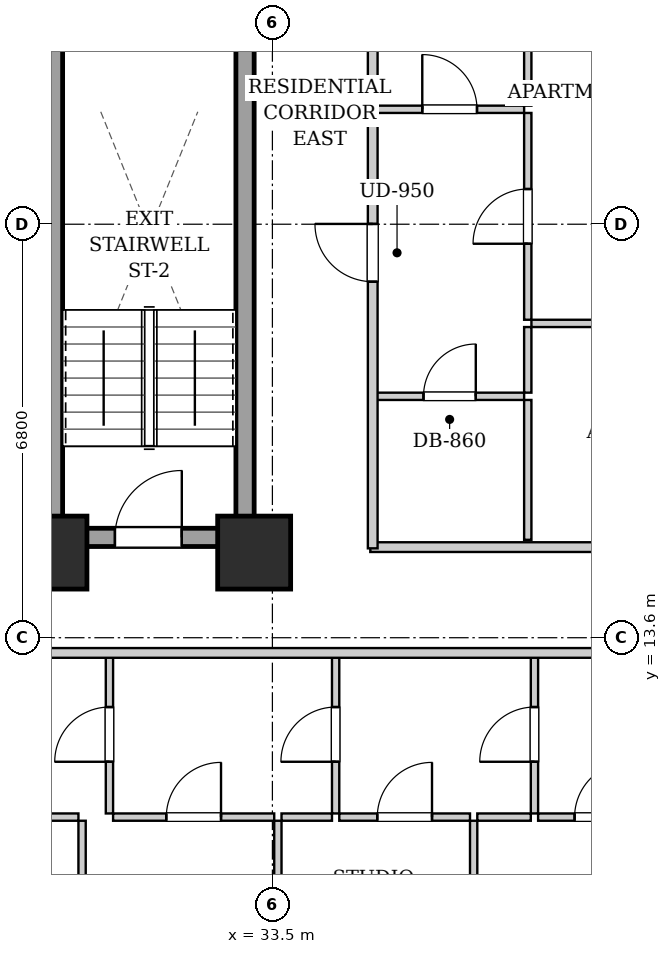
"""IFC4 building model, lengths in metres.
Left out: names, types, materials, properties, quantities, classifications, styles, units other than length and angle.
Written with IfcOpenShell. Run it as: python <this file> out.ifc"""

import sys

from ifc_helpers import new_model, si_unit, direction, frame, frame_2d, origin, origin_2d, place, context, subcontext, project, spatial, rectangle, extrude, element, fill, save


model = new_model("IFC4")
c1 = context("Model", 3, precision=1e-05, world=origin(), true_north=direction((0.0, 1.0)))
c2 = subcontext(c1, "Body", "Model", "MODEL_VIEW")
j1 = project(units=[si_unit("LENGTHUNIT", "METRE"), si_unit("PLANEANGLEUNIT", "RADIAN")], contexts=[c1])
p1 = place(None, origin())
s1 = spatial("IfcSite", under=j1, at=p1, CompositionType="ELEMENT")
p2 = place(p1, origin())
s2 = spatial("IfcBuilding", under=s1, at=p2, CompositionType="ELEMENT")
p3 = place(p2, frame((0.0, 0.0, 25.8)))
s3 = spatial("IfcBuildingStorey", under=s2, at=p3, CompositionType="ELEMENT", Elevation=25.8)
for number, where, z_axis, x_axis in (
    (1, (29.85, 15.0, 0.0), (0.0, 0.0, 1.0), (1.0, 0.0, 0.0)),
    (2, (33.2, 15.0, 0.0), (0.0, 0.0, 1.0), (1.0, 0.0, 0.0)),
):
    element("IfcColumn", number, at=place(p3, frame(where, z_axis=z_axis, x_axis=x_axis)), inside=s3, PredefinedType="COLUMN", context=c2, shape_type="SweptSolid", body=[
        extrude(rectangle(XDim=1.2, YDim=1.2, at=origin_2d()), origin(), (0.0, 0.0, 1.0), 3.2),
    ])
for number, where, z_axis, x_axis in (
    (3, (29.9, 15.1, 0.0), (0.0, 0.0, 1.0), (0.0, 1.0, 0.0)),
    (4, (33.05, 15.1, 0.0), (0.0, 0.0, 1.0), (0.0, 1.0, 0.0)),
):
    element("IfcWall", number, at=place(p3, frame(where, z_axis=z_axis, x_axis=x_axis)), inside=s3, PredefinedType="SHEAR", context=c2, shape_type="SweptSolid", body=[
        extrude(rectangle(XDim=9.0, YDim=0.3, at=frame_2d((4.5, 0.0))), origin(), (0.0, 0.0, 1.0), 2.94),
    ])
p4 = place(p3, frame((30.05, 15.25, 0.0), z_axis=(0.0, 0.0, 1.0), x_axis=(1.0, 0.0, 0.0)))
e5 = element("IfcWall", 5, at=p4, inside=s3, PredefinedType="SHEAR", context=c2, shape_type="SweptSolid", body=[
    extrude(rectangle(XDim=2.85, YDim=0.3, at=frame_2d((1.425, 0.0))), origin(), (0.0, 0.0, 1.0), 2.94),
])
p5 = place(p4, frame((0.86, 0.0, 0.0)))
e6 = element("IfcOpeningElement", 6, at=p5, cuts=e5, PredefinedType="OPENING", context=c2, shape_type="SweptSolid", body=[
    extrude(rectangle(XDim=1.1, YDim=2.05, at=frame_2d((0.55, 1.025))), frame((0.0, 0.16, 0.0), z_axis=(0.0, -1.0, 0.0), x_axis=(1.0, 0.0, 0.0)), (0.0, 0.0, 1.0), 0.32),
])
p6 = place(p3, frame((35.11, 15.09, 0.0), z_axis=(0.0, 0.0, 1.0), x_axis=(1.0, 0.0, 0.0)))
e7 = element("IfcWall", 7, at=p6, inside=s3, PredefinedType="PARTITIONING", context=c2, shape_type="SweptSolid", body=[
    extrude(rectangle(XDim=11.11, YDim=0.16, at=frame_2d((5.555, 0.0))), origin(), (0.0, 0.0, 1.0), 2.155),
])
p7 = place(p3, frame((30.82, 10.71, 0.0), z_axis=(0.0, 0.0, 1.0), x_axis=(0.0, 1.0, 0.0)))
e8 = element("IfcWall", 8, at=p7, inside=s3, PredefinedType="PARTITIONING", context=c2, shape_type="SweptSolid", body=[
    extrude(rectangle(XDim=2.6, YDim=0.12, at=frame_2d((1.3, 0.0))), origin(), (0.0, 0.0, 1.0), 2.94),
])
p8 = place(p7, frame((0.85, 0.0, 0.0)))
e9 = element("IfcOpeningElement", 9, at=p8, cuts=e8, PredefinedType="OPENING", context=c2, shape_type="SweptSolid", body=[
    extrude(rectangle(XDim=0.9, YDim=2.05, at=frame_2d((0.45, 1.025))), frame((0.0, 0.07, 0.0), z_axis=(0.0, -1.0, 0.0), x_axis=(1.0, 0.0, 0.0)), (0.0, 0.0, 1.0), 0.14),
])
p9 = place(p3, frame((27.61, 10.65, 0.0), z_axis=(0.0, 0.0, 1.0), x_axis=(1.0, 0.0, 0.0)))
e10 = element("IfcWall", 10, at=p9, inside=s3, PredefinedType="PARTITIONING", context=c2, shape_type="SweptSolid", body=[
    extrude(rectangle(XDim=2.7, YDim=0.12, at=frame_2d((1.35, 0.0))), origin(), (0.0, 0.0, 1.0), 2.94),
])
p10 = place(p9, frame((0.9, 0.0, 0.0)))
e11 = element("IfcOpeningElement", 11, at=p10, cuts=e10, PredefinedType="OPENING", context=c2, shape_type="SweptSolid", body=[
    extrude(rectangle(XDim=0.9, YDim=2.05, at=frame_2d((0.45, 1.025))), frame((0.0, 0.07, 0.0), z_axis=(0.0, -1.0, 0.0), x_axis=(1.0, 0.0, 0.0)), (0.0, 0.0, 1.0), 0.14),
])
p11 = place(p3, frame((34.54, 10.71, 0.0), z_axis=(0.0, 0.0, 1.0), x_axis=(0.0, 1.0, 0.0)))
e12 = element("IfcWall", 12, at=p11, inside=s3, PredefinedType="PARTITIONING", context=c2, shape_type="SweptSolid", body=[
    extrude(rectangle(XDim=2.6, YDim=0.12, at=frame_2d((1.3, 0.0))), origin(), (0.0, 0.0, 1.0), 2.94),
])
p12 = place(p11, frame((0.85, 0.0, 0.0)))
e13 = element("IfcOpeningElement", 13, at=p12, cuts=e12, PredefinedType="OPENING", context=c2, shape_type="SweptSolid", body=[
    extrude(rectangle(XDim=0.9, YDim=2.05, at=frame_2d((0.45, 1.025))), frame((0.0, 0.07, 0.0), z_axis=(0.0, -1.0, 0.0), x_axis=(1.0, 0.0, 0.0)), (0.0, 0.0, 1.0), 0.14),
])
p13 = place(p3, frame((30.88, 10.65, 0.0), z_axis=(0.0, 0.0, 1.0), x_axis=(1.0, 0.0, 0.0)))
e14 = element("IfcWall", 14, at=p13, inside=s3, PredefinedType="PARTITIONING", context=c2, shape_type="SweptSolid", body=[
    extrude(rectangle(XDim=2.65, YDim=0.12, at=frame_2d((1.325, 0.0))), origin(), (0.0, 0.0, 1.0), 2.94),
])
p14 = place(p13, frame((0.875, 0.0, 0.0)))
e15 = element("IfcOpeningElement", 15, at=p14, cuts=e14, PredefinedType="OPENING", context=c2, shape_type="SweptSolid", body=[
    extrude(rectangle(XDim=0.9, YDim=2.05, at=frame_2d((0.45, 1.025))), frame((0.0, 0.07, 0.0), z_axis=(0.0, -1.0, 0.0), x_axis=(1.0, 0.0, 0.0)), (0.0, 0.0, 1.0), 0.14),
])
p15 = place(p3, frame((33.65, 10.65, 0.0), z_axis=(0.0, 0.0, 1.0), x_axis=(1.0, 0.0, 0.0)))
e16 = element("IfcWall", 16, at=p15, inside=s3, PredefinedType="PARTITIONING", context=c2, shape_type="SweptSolid", body=[
    extrude(rectangle(XDim=0.83, YDim=0.12, at=frame_2d((0.415, 0.0))), origin(), (0.0, 0.0, 1.0), 2.94),
])
p16 = place(p3, frame((37.81, 10.71, 0.0), z_axis=(0.0, 0.0, 1.0), x_axis=(0.0, 1.0, 0.0)))
e17 = element("IfcWall", 17, at=p16, inside=s3, PredefinedType="PARTITIONING", context=c2, shape_type="SweptSolid", body=[
    extrude(rectangle(XDim=2.6, YDim=0.12, at=frame_2d((1.3, 0.0))), origin(), (0.0, 0.0, 1.0), 2.94),
])
p17 = place(p16, frame((0.85, 0.0, 0.0)))
e18 = element("IfcOpeningElement", 18, at=p17, cuts=e17, PredefinedType="OPENING", context=c2, shape_type="SweptSolid", body=[
    extrude(rectangle(XDim=0.9, YDim=2.05, at=frame_2d((0.45, 1.025))), frame((0.0, 0.07, 0.0), z_axis=(0.0, -1.0, 0.0), x_axis=(1.0, 0.0, 0.0)), (0.0, 0.0, 1.0), 0.14),
])
p18 = place(p3, frame((34.6, 10.65, 0.0), z_axis=(0.0, 0.0, 1.0), x_axis=(1.0, 0.0, 0.0)))
e19 = element("IfcWall", 19, at=p18, inside=s3, PredefinedType="PARTITIONING", context=c2, shape_type="SweptSolid", body=[
    extrude(rectangle(XDim=2.15, YDim=0.12, at=frame_2d((1.075, 0.0))), origin(), (0.0, 0.0, 1.0), 2.94),
])
p19 = place(p18, frame((0.625, 0.0, 0.0)))
e20 = element("IfcOpeningElement", 20, at=p19, cuts=e19, PredefinedType="OPENING", context=c2, shape_type="SweptSolid", body=[
    extrude(rectangle(XDim=0.9, YDim=2.05, at=frame_2d((0.45, 1.025))), frame((0.0, 0.07, 0.0), z_axis=(0.0, -1.0, 0.0), x_axis=(1.0, 0.0, 0.0)), (0.0, 0.0, 1.0), 0.14),
])
p20 = place(p3, frame((36.87, 10.65, 0.0), z_axis=(0.0, 0.0, 1.0), x_axis=(1.0, 0.0, 0.0)))
e21 = element("IfcWall", 21, at=p20, inside=s3, PredefinedType="PARTITIONING", context=c2, shape_type="SweptSolid", body=[
    extrude(rectangle(XDim=0.88, YDim=0.12, at=frame_2d((0.44, 0.0))), origin(), (0.0, 0.0, 1.0), 2.94),
])
p21 = place(p3, frame((37.87, 10.65, 0.0), z_axis=(0.0, 0.0, 1.0), x_axis=(1.0, 0.0, 0.0)))
e22 = element("IfcWall", 22, at=p21, inside=s3, PredefinedType="PARTITIONING", context=c2, shape_type="SweptSolid", body=[
    extrude(rectangle(XDim=2.1, YDim=0.12, at=frame_2d((1.05, 0.0))), origin(), (0.0, 0.0, 1.0), 2.94),
])
p22 = place(p21, frame((0.6, 0.0, 0.0)))
e23 = element("IfcOpeningElement", 23, at=p22, cuts=e22, PredefinedType="OPENING", context=c2, shape_type="SweptSolid", body=[
    extrude(rectangle(XDim=0.9, YDim=2.05, at=frame_2d((0.45, 1.025))), frame((0.0, 0.07, 0.0), z_axis=(0.0, -1.0, 0.0), x_axis=(1.0, 0.0, 0.0)), (0.0, 0.0, 1.0), 0.14),
])
p23 = place(p3, frame((30.37, 0.28, 0.0), z_axis=(0.0, 0.0, 1.0), x_axis=(0.0, 1.0, 0.0)))
e24 = element("IfcWall", 24, at=p23, inside=s3, PredefinedType="PARTITIONING", context=c2, shape_type="SweptSolid", body=[
    extrude(rectangle(XDim=10.31, YDim=0.12, at=frame_2d((5.155, 0.0))), origin(), (0.0, 0.0, 1.0), 2.94),
])
p24 = place(p23, frame((4.69, 0.0, 0.0)))
e25 = element("IfcOpeningElement", 25, at=p24, cuts=e24, PredefinedType="OPENING", context=c2, shape_type="SweptSolid", body=[
    extrude(rectangle(XDim=0.9, YDim=2.05, at=frame_2d((0.45, 1.025))), frame((0.0, 0.07, 0.0), z_axis=(0.0, -1.0, 0.0), x_axis=(1.0, 0.0, 0.0)), (0.0, 0.0, 1.0), 0.14),
])
p25 = place(p3, frame((33.59, 0.28, 0.0), z_axis=(0.0, 0.0, 1.0), x_axis=(0.0, 1.0, 0.0)))
e26 = element("IfcWall", 26, at=p25, inside=s3, PredefinedType="PARTITIONING", context=c2, shape_type="SweptSolid", body=[
    extrude(rectangle(XDim=10.31, YDim=0.12, at=frame_2d((5.155, 0.0))), origin(), (0.0, 0.0, 1.0), 2.94),
])
p26 = place(p25, frame((4.69, 0.0, 0.0)))
e27 = element("IfcOpeningElement", 27, at=p26, cuts=e26, PredefinedType="OPENING", context=c2, shape_type="SweptSolid", body=[
    extrude(rectangle(XDim=0.9, YDim=2.05, at=frame_2d((0.45, 1.025))), frame((0.0, 0.07, 0.0), z_axis=(0.0, -1.0, 0.0), x_axis=(1.0, 0.0, 0.0)), (0.0, 0.0, 1.0), 0.14),
])
p27 = place(p3, frame((36.81, 0.28, 0.0), z_axis=(0.0, 0.0, 1.0), x_axis=(0.0, 1.0, 0.0)))
e28 = element("IfcWall", 28, at=p27, inside=s3, PredefinedType="PARTITIONING", context=c2, shape_type="SweptSolid", body=[
    extrude(rectangle(XDim=10.31, YDim=0.12, at=frame_2d((5.155, 0.0))), origin(), (0.0, 0.0, 1.0), 2.94),
])
p28 = place(p27, frame((4.69, 0.0, 0.0)))
e29 = element("IfcOpeningElement", 29, at=p28, cuts=e28, PredefinedType="OPENING", context=c2, shape_type="SweptSolid", body=[
    extrude(rectangle(XDim=0.9, YDim=2.05, at=frame_2d((0.45, 1.025))), frame((0.0, 0.07, 0.0), z_axis=(0.0, -1.0, 0.0), x_axis=(1.0, 0.0, 0.0)), (0.0, 0.0, 1.0), 0.14),
])
p29 = place(p3, frame((35.19, 22.29, 0.0), z_axis=(0.0, 0.0, 1.0), x_axis=(1.0, 0.0, 0.0)))
e30 = element("IfcWall", 30, at=p29, inside=s3, PredefinedType="PARTITIONING", context=c2, shape_type="SweptSolid", body=[
    extrude(rectangle(XDim=2.45, YDim=0.12, at=frame_2d((1.225, 0.0))), origin(), (0.0, 0.0, 1.0), 2.94),
])
p30 = place(p29, frame((0.775, 0.0, 0.0)))
e31 = element("IfcOpeningElement", 31, at=p30, cuts=e30, PredefinedType="OPENING", context=c2, shape_type="SweptSolid", body=[
    extrude(rectangle(XDim=0.9, YDim=2.05, at=frame_2d((0.45, 1.025))), frame((0.0, 0.07, 0.0), z_axis=(0.0, -1.0, 0.0), x_axis=(1.0, 0.0, 0.0)), (0.0, 0.0, 1.0), 0.14),
])
p31 = place(p3, frame((37.7, 22.35, 0.0), z_axis=(0.0, 0.0, 1.0), x_axis=(0.0, 1.0, 0.0)))
e32 = element("IfcWall", 32, at=p31, inside=s3, PredefinedType="PARTITIONING", context=c2, shape_type="SweptSolid", body=[
    extrude(rectangle(XDim=2.891, YDim=0.12, at=frame_2d((1.445, 0.0))), origin(), (0.0, 0.0, 1.0), 2.94),
])
p32 = place(p31, frame((0.995, 0.0, 0.0)))
e33 = element("IfcOpeningElement", 33, at=p32, cuts=e32, PredefinedType="OPENING", context=c2, shape_type="SweptSolid", body=[
    extrude(rectangle(XDim=0.9, YDim=2.05, at=frame_2d((0.45, 1.025))), frame((0.0, 0.07, 0.0), z_axis=(0.0, -1.0, 0.0), x_axis=(1.0, 0.0, 0.0)), (0.0, 0.0, 1.0), 0.14),
])
p33 = place(p3, frame((35.19, 17.57, 0.0), z_axis=(0.0, 0.0, 1.0), x_axis=(1.0, 0.0, 0.0)))
e34 = element("IfcWall", 34, at=p33, inside=s3, PredefinedType="PARTITIONING", context=c2, shape_type="SweptSolid", body=[
    extrude(rectangle(XDim=2.45, YDim=0.12, at=frame_2d((1.225, 0.0))), origin(), (0.0, 0.0, 1.0), 2.94),
])
p34 = place(p33, frame((0.795, 0.0, 0.0)))
e35 = element("IfcOpeningElement", 35, at=p34, cuts=e34, PredefinedType="OPENING", context=c2, shape_type="SweptSolid", body=[
    extrude(rectangle(XDim=0.86, YDim=2.05, at=frame_2d((0.43, 1.025))), frame((0.0, 0.07, 0.0), z_axis=(0.0, -1.0, 0.0), x_axis=(1.0, 0.0, 0.0)), (0.0, 0.0, 1.0), 0.14),
])
p35 = place(p3, frame((37.7, 15.21, 0.0), z_axis=(0.0, 0.0, 1.0), x_axis=(0.0, 1.0, 0.0)))
e36 = element("IfcWall", 36, at=p35, inside=s3, PredefinedType="PARTITIONING", context=c2, shape_type="SweptSolid", body=[
    extrude(rectangle(XDim=2.3, YDim=0.12, at=frame_2d((1.15, 0.0))), origin(), (0.0, 0.0, 1.0), 2.94),
])
p36 = place(p3, frame((37.7, 17.63, 0.0), z_axis=(0.0, 0.0, 1.0), x_axis=(0.0, 1.0, 0.0)))
e37 = element("IfcWall", 37, at=p36, inside=s3, PredefinedType="PARTITIONING", context=c2, shape_type="SweptSolid", body=[
    extrude(rectangle(XDim=1.079, YDim=0.12, at=frame_2d((0.54, 0.0))), origin(), (0.0, 0.0, 1.0), 2.94),
])
p37 = place(p3, frame((37.7, 18.829, 0.0), z_axis=(0.0, 0.0, 1.0), x_axis=(0.0, 1.0, 0.0)))
e38 = element("IfcWall", 38, at=p37, inside=s3, PredefinedType="PARTITIONING", context=c2, shape_type="SweptSolid", body=[
    extrude(rectangle(XDim=3.401, YDim=0.12, at=frame_2d((1.7, 0.0))), origin(), (0.0, 0.0, 1.0), 2.94),
])
p38 = place(p37, frame((1.25, 0.0, 0.0)))
e39 = element("IfcOpeningElement", 39, at=p38, cuts=e38, PredefinedType="OPENING", context=c2, shape_type="SweptSolid", body=[
    extrude(rectangle(XDim=0.9, YDim=2.05, at=frame_2d((0.45, 1.025))), frame((0.0, 0.07, 0.0), z_axis=(0.0, -1.0, 0.0), x_axis=(1.0, 0.0, 0.0)), (0.0, 0.0, 1.0), 0.14),
])
p39 = place(p3, frame((37.76, 18.769, 0.0), z_axis=(0.0, 0.0, 1.0), x_axis=(1.0, 0.0, 0.0)))
e40 = element("IfcWall", 40, at=p39, inside=s3, PredefinedType="PARTITIONING", context=c2, shape_type="SweptSolid", body=[
    extrude(rectangle(XDim=8.46, YDim=0.12, at=frame_2d((4.23, 0.0))), origin(), (0.0, 0.0, 1.0), 2.94),
])
p40 = place(p39, frame((3.765, 0.0, 0.0)))
e41 = element("IfcOpeningElement", 41, at=p40, cuts=e40, PredefinedType="OPENING", context=c2, shape_type="SweptSolid", body=[
    extrude(rectangle(XDim=0.9, YDim=2.05, at=frame_2d((0.45, 1.025))), frame((0.0, 0.07, 0.0), z_axis=(0.0, -1.0, 0.0), x_axis=(1.0, 0.0, 0.0)), (0.0, 0.0, 1.0), 0.14),
])
p41 = place(p3, frame((10.05, 13.35, 0.0), z_axis=(0.0, 0.0, 1.0), x_axis=(1.0, 0.0, 0.0)))
e42 = element("IfcWall", 42, at=p41, inside=s3, PredefinedType="PARTITIONING", context=c2, shape_type="SweptSolid", body=[
    extrude(rectangle(XDim=33.9, YDim=0.16, at=frame_2d((16.95, 0.0))), origin(), (0.0, 0.0, 1.0), 2.94),
])
p42 = place(p41, frame((4.165, 0.0, 0.0)))
e43 = element("IfcOpeningElement", 43, at=p42, cuts=e42, PredefinedType="OPENING", context=c2, shape_type="SweptSolid", body=[
    extrude(rectangle(XDim=0.95, YDim=2.1, at=frame_2d((0.475, 1.05))), frame((0.0, 0.09, 0.0), z_axis=(0.0, -1.0, 0.0), x_axis=(1.0, 0.0, 0.0)), (0.0, 0.0, 1.0), 0.18),
])
p43 = place(p3, frame((35.15, 15.07, 0.0), z_axis=(0.0, 0.0, 1.0), x_axis=(0.0, 1.0, 0.0)))
e44 = element("IfcWall", 44, at=p43, inside=s3, PredefinedType="PARTITIONING", context=c2, shape_type="SweptSolid", body=[
    extrude(rectangle(XDim=13.93, YDim=0.16, at=frame_2d((6.965, 0.0))), origin(), (0.0, 0.0, 1.0), 2.94),
])
p44 = place(p43, frame((4.385, 0.0, 0.0)))
e45 = element("IfcOpeningElement", 45, at=p44, cuts=e44, PredefinedType="OPENING", context=c2, shape_type="SweptSolid", body=[
    extrude(rectangle(XDim=0.95, YDim=2.1, at=frame_2d((0.475, 1.05))), frame((0.0, 0.09, 0.0), z_axis=(0.0, -1.0, 0.0), x_axis=(1.0, 0.0, 0.0)), (0.0, 0.0, 1.0), 0.18),
])
p45 = place(p5, origin())
e46 = element("IfcDoor", 46, at=p45, inside=s3, OperationType="SINGLE_SWING_RIGHT", PredefinedType="DOOR", context=c2, shape_type="SweptSolid", body=[
    extrude(rectangle(XDim=1.1, YDim=2.05, at=frame_2d((0.55, 1.025))), frame((0.0, 0.025, 0.0), z_axis=(0.0, -1.0, 0.0), x_axis=(1.0, 0.0, 0.0)), (0.0, 0.0, 1.0), 0.05),
])
fill(e6, e46)
p46 = place(p8, origin())
e47 = element("IfcDoor", 47, at=p46, inside=s3, OperationType="SINGLE_SWING_LEFT", PredefinedType="DOOR", context=c2, shape_type="SweptSolid", body=[
    extrude(rectangle(XDim=0.9, YDim=2.05, at=frame_2d((0.45, 1.025))), frame((0.0, 0.025, 0.0), z_axis=(0.0, -1.0, 0.0), x_axis=(1.0, 0.0, 0.0)), (0.0, 0.0, 1.0), 0.05),
])
fill(e9, e47)
p47 = place(p12, origin())
e48 = element("IfcDoor", 48, at=p47, inside=s3, OperationType="SINGLE_SWING_LEFT", PredefinedType="DOOR", context=c2, shape_type="SweptSolid", body=[
    extrude(rectangle(XDim=0.9, YDim=2.05, at=frame_2d((0.45, 1.025))), frame((0.0, 0.025, 0.0), z_axis=(0.0, -1.0, 0.0), x_axis=(1.0, 0.0, 0.0)), (0.0, 0.0, 1.0), 0.05),
])
fill(e13, e48)
p48 = place(p14, origin())
e49 = element("IfcDoor", 49, at=p48, inside=s3, OperationType="SINGLE_SWING_RIGHT", PredefinedType="DOOR", context=c2, shape_type="SweptSolid", body=[
    extrude(rectangle(XDim=0.9, YDim=2.05, at=frame_2d((0.45, 1.025))), frame((0.0, 0.025, 0.0), z_axis=(0.0, -1.0, 0.0), x_axis=(1.0, 0.0, 0.0)), (0.0, 0.0, 1.0), 0.05),
])
fill(e15, e49)
p49 = place(p17, origin())
e50 = element("IfcDoor", 50, at=p49, inside=s3, OperationType="SINGLE_SWING_LEFT", PredefinedType="DOOR", context=c2, shape_type="SweptSolid", body=[
    extrude(rectangle(XDim=0.9, YDim=2.05, at=frame_2d((0.45, 1.025))), frame((0.0, 0.025, 0.0), z_axis=(0.0, -1.0, 0.0), x_axis=(1.0, 0.0, 0.0)), (0.0, 0.0, 1.0), 0.05),
])
fill(e18, e50)
p50 = place(p19, origin())
e51 = element("IfcDoor", 51, at=p50, inside=s3, OperationType="SINGLE_SWING_RIGHT", PredefinedType="DOOR", context=c2, shape_type="SweptSolid", body=[
    extrude(rectangle(XDim=0.9, YDim=2.05, at=frame_2d((0.45, 1.025))), frame((0.0, 0.025, 0.0), z_axis=(0.0, -1.0, 0.0), x_axis=(1.0, 0.0, 0.0)), (0.0, 0.0, 1.0), 0.05),
])
fill(e20, e51)
p51 = place(p22, origin())
e52 = element("IfcDoor", 52, at=p51, inside=s3, OperationType="SINGLE_SWING_RIGHT", PredefinedType="DOOR", context=c2, shape_type="SweptSolid", body=[
    extrude(rectangle(XDim=0.9, YDim=2.05, at=frame_2d((0.45, 1.025))), frame((0.0, 0.025, 0.0), z_axis=(0.0, -1.0, 0.0), x_axis=(1.0, 0.0, 0.0)), (0.0, 0.0, 1.0), 0.05),
])
fill(e23, e52)
p52 = place(p30, origin())
e53 = element("IfcDoor", 53, at=p52, inside=s3, OperationType="SINGLE_SWING_LEFT", PredefinedType="DOOR", context=c2, shape_type="SweptSolid", body=[
    extrude(rectangle(XDim=0.9, YDim=2.05, at=frame_2d((0.45, 1.025))), frame((0.0, 0.025, 0.0), z_axis=(0.0, -1.0, 0.0), x_axis=(1.0, 0.0, 0.0)), (0.0, 0.0, 1.0), 0.05),
])
fill(e31, e53)
p53 = place(p34, origin())
e54 = element("IfcDoor", 54, at=p53, inside=s3, OperationType="SINGLE_SWING_RIGHT", PredefinedType="DOOR", context=c2, shape_type="SweptSolid", body=[
    extrude(rectangle(XDim=0.86, YDim=2.05, at=frame_2d((0.43, 1.025))), frame((0.0, 0.025, 0.0), z_axis=(0.0, -1.0, 0.0), x_axis=(1.0, 0.0, 0.0)), (0.0, 0.0, 1.0), 0.05),
])
fill(e35, e54)
p54 = place(p38, origin())
e55 = element("IfcDoor", 55, at=p54, inside=s3, OperationType="SINGLE_SWING_LEFT", PredefinedType="DOOR", context=c2, shape_type="SweptSolid", body=[
    extrude(rectangle(XDim=0.9, YDim=2.05, at=frame_2d((0.45, 1.025))), frame((0.0, 0.025, 0.0), z_axis=(0.0, -1.0, 0.0), x_axis=(1.0, 0.0, 0.0)), (0.0, 0.0, 1.0), 0.05),
])
fill(e39, e55)
p55 = place(p44, origin())
e56 = element("IfcDoor", 56, at=p55, inside=s3, OperationType="SINGLE_SWING_RIGHT", PredefinedType="DOOR", context=c2, shape_type="SweptSolid", body=[
    extrude(rectangle(XDim=0.95, YDim=2.1, at=frame_2d((0.475, 1.05))), frame((0.0, 0.025, 0.0), z_axis=(0.0, -1.0, 0.0), x_axis=(1.0, 0.0, 0.0)), (0.0, 0.0, 1.0), 0.05),
])
fill(e45, e56)
save(model, sys.argv[1])
